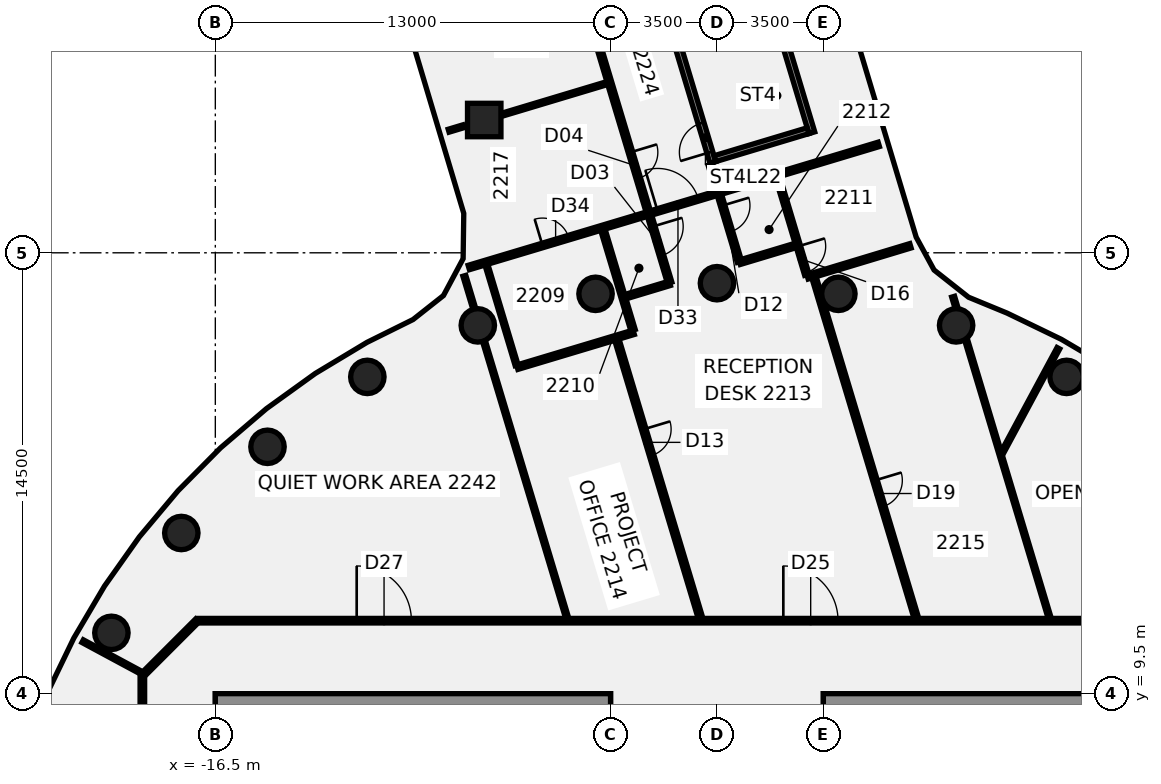
"""IFC4 building model, lengths in metres.
Left out: names, types, materials, properties, quantities, classifications, styles, units other than length and angle.
Written with IfcOpenShell. Run it as: python <this file> out.ifc"""

import sys

from ifc_helpers import new_model, si_unit, direction, frame, frame_2d, origin, origin_2d, place, context, subcontext, project, spatial, rectangle, circle, extrude, element, fill, save


model = new_model("IFC4")
c1 = context("Model", 3, precision=1e-05, world=origin(), true_north=direction((0.0, 1.0)))
c2 = subcontext(c1, "Body", "Model", "MODEL_VIEW")
j1 = project(units=[si_unit("LENGTHUNIT", "METRE"), si_unit("PLANEANGLEUNIT", "RADIAN")], contexts=[c1])
p1 = place(None, origin())
s1 = spatial("IfcSite", under=j1, at=p1, CompositionType="ELEMENT")
p2 = place(p1, origin())
s2 = spatial("IfcBuilding", under=s1, at=p2, CompositionType="ELEMENT")
p3 = place(p2, frame((0.0, 0.0, 94.75)))
s3 = spatial("IfcBuildingStorey", under=s2, at=p3, CompositionType="ELEMENT", Elevation=94.75)
for number, where, z_axis, x_axis in (
    (1, (11.5, 19.919, -0.14), (0.0, 0.0, 1.0), (1.0, 0.0, 0.0)),
    (2, (7.866, 21.613, -0.14), (0.0, 0.0, 1.0), (1.0, 0.0, 0.0)),
    (3, (3.994, 22.651, -0.14), (0.0, 0.0, 1.0), (1.0, 0.0, 0.0)),
    (4, (0.0, 23.0, -0.14), (0.0, 0.0, 1.0), (1.0, 0.0, 0.0)),
    (5, (-3.994, 22.651, -0.14), (0.0, 0.0, 1.0), (1.0, 0.0, 0.0)),
    (6, (-7.866, 21.613, -0.14), (0.0, 0.0, 1.0), (1.0, 0.0, 0.0)),
    (7, (-11.5, 19.919, -0.14), (0.0, 0.0, 1.0), (1.0, 0.0, 0.0)),
    (8, (-14.784, 17.619, -0.14), (0.0, 0.0, 1.0), (1.0, 0.0, 0.0)),
    (9, (-17.619, 14.784, -0.14), (0.0, 0.0, 1.0), (1.0, 0.0, 0.0)),
    (10, (-19.919, 11.5, -0.14), (0.0, 0.0, 1.0), (1.0, 0.0, 0.0)),
):
    element("IfcColumn", number, at=place(p3, frame(where, z_axis=z_axis, x_axis=x_axis)), inside=s3, PredefinedType="COLUMN", context=c2, shape_type="SweptSolid", body=[
        extrude(circle(Radius=0.55, at=origin_2d()), origin(), (0.0, 0.0, 1.0), 3.75),
    ])
p4 = place(p3, frame((-7.655, 28.367, -0.139), z_axis=(-0.030585033577, -0.037482934766, 0.998829107166), x_axis=(0.95704029612, 0.28717120329, 0.040082060869)))
e11 = element("IfcColumn", 11, at=p4, inside=s3, PredefinedType="COLUMN", context=c2, shape_type="SweptSolid", body=[
    extrude(rectangle(XDim=1.1, YDim=1.1, at=origin_2d()), origin(), (0.0, 0.0, 1.0), 3.752),
])
p5 = place(p3, frame((-8.309, 23.243, 0.0), z_axis=(0.0, 0.0, 1.0), x_axis=(0.287640433477, -0.957738472146, 0.0)))
e12 = element("IfcWall", 12, at=p5, inside=s3, PredefinedType="PARTITIONING", context=c2, shape_type="SweptSolid", body=[
    extrude(rectangle(XDim=1.148, YDim=0.1, at=frame_2d((0.574, 0.0))), origin(), (0.0, 0.0, 1.0), 3.01),
])
p6 = place(p3, frame((-7.667, 21.106, 0.0), z_axis=(0.0, 0.0, 1.0), x_axis=(0.287634372124, -0.95774029255, 0.0)))
e13 = element("IfcWall", 13, at=p6, inside=s3, PredefinedType="PARTITIONING", context=c2, shape_type="SweptSolid", body=[
    extrude(rectangle(XDim=9.538, YDim=0.1, at=frame_2d((4.769, 0.0))), origin(), (0.0, 0.0, 1.0), 3.01),
])
p7 = place(p3, frame((-7.584, 23.611, 0.0), z_axis=(0.0, 0.0, 1.0), x_axis=(0.287866572173, -0.957670526134, 0.0)))
e14 = element("IfcWall", 14, at=p7, inside=s3, PredefinedType="PARTITIONING", context=c2, shape_type="SweptSolid", body=[
    extrude(rectangle(XDim=3.454, YDim=0.1, at=frame_2d((1.727, 0.0))), origin(), (0.0, 0.0, 1.0), 3.01),
])
p8 = place(p3, frame((-7.398, 42.462, 0.0), z_axis=(0.0, 0.0, 1.0), x_axis=(0.287760411209, -0.957702430686, 0.0)))
e15 = element("IfcWall", 15, at=p8, inside=s3, PredefinedType="PARTITIONING", context=c2, shape_type="SweptSolid", body=[
    extrude(rectangle(XDim=20.305, YDim=0.15, at=frame_2d((10.153, 0.0))), origin(), (0.0, 0.0, 1.0), 3.01),
])
p9 = place(p8, frame((18.376, 0.0, 0.0)))
e16 = element("IfcOpeningElement", 16, at=p9, cuts=e15, PredefinedType="OPENING", context=c2, shape_type="SweptSolid", body=[
    extrude(rectangle(XDim=1.0, YDim=2.1, at=frame_2d((0.5, 1.05))), frame((0.0, 0.085, 0.0), z_axis=(0.0, -1.0, 0.0), x_axis=(1.0, 0.0, 0.0)), (0.0, 0.0, 1.0), 0.17),
])
p10 = place(p8, frame((15.825, 0.0, 0.0)))
e17 = element("IfcOpeningElement", 17, at=p10, cuts=e15, PredefinedType="OPENING", context=c2, shape_type="SweptSolid", body=[
    extrude(rectangle(XDim=0.9, YDim=2.1, at=frame_2d((0.45, 1.05))), frame((0.0, 0.085, 0.0), z_axis=(0.0, -1.0, 0.0), x_axis=(1.0, 0.0, 0.0)), (0.0, 0.0, 1.0), 0.17),
])
p11 = place(p8, frame((10.125, 0.0, 0.0)))
e18 = element("IfcOpeningElement", 18, at=p11, cuts=e15, PredefinedType="OPENING", context=c2, shape_type="SweptSolid", body=[
    extrude(rectangle(XDim=0.9, YDim=2.1, at=frame_2d((0.45, 1.05))), frame((0.0, 0.085, 0.0), z_axis=(0.0, -1.0, 0.0), x_axis=(1.0, 0.0, 0.0)), (0.0, 0.0, 1.0), 0.17),
])
p12 = place(p8, frame((6.825, 0.0, 0.0)))
e19 = element("IfcOpeningElement", 19, at=p12, cuts=e15, PredefinedType="OPENING", context=c2, shape_type="SweptSolid", body=[
    extrude(rectangle(XDim=0.9, YDim=2.1, at=frame_2d((0.45, 1.05))), frame((0.0, 0.085, 0.0), z_axis=(0.0, -1.0, 0.0), x_axis=(1.0, 0.0, 0.0)), (0.0, 0.0, 1.0), 0.17),
])
p13 = place(p8, frame((2.325, 0.0, 0.0)))
e20 = element("IfcOpeningElement", 20, at=p13, cuts=e15, PredefinedType="OPENING", context=c2, shape_type="SweptSolid", body=[
    extrude(rectangle(XDim=0.9, YDim=2.1, at=frame_2d((0.45, 1.05))), frame((0.0, 0.085, 0.0), z_axis=(0.0, -1.0, 0.0), x_axis=(1.0, 0.0, 0.0)), (0.0, 0.0, 1.0), 0.17),
])
p14 = place(p3, frame((-0.22, 26.903, 0.0), z_axis=(0.0, 0.0, 1.0), x_axis=(0.287616169205, -0.957745759172, 0.0)))
e21 = element("IfcWall", 21, at=p14, inside=s3, PredefinedType="PARTITIONING", context=c2, shape_type="SweptSolid", body=[
    extrude(rectangle(XDim=3.339, YDim=0.15, at=frame_2d((1.67, 0.0))), origin(), (0.0, 0.0, 1.0), 3.01),
])
p15 = place(p14, frame((1.409, 0.0, 0.0)))
e22 = element("IfcOpeningElement", 22, at=p15, cuts=e21, PredefinedType="OPENING", context=c2, shape_type="SweptSolid", body=[
    extrude(rectangle(XDim=0.9, YDim=2.1, at=frame_2d((0.45, 1.05))), frame((0.0, 0.085, 0.0), z_axis=(0.0, -1.0, 0.0), x_axis=(1.0, 0.0, 0.0)), (0.0, 0.0, 1.0), 0.17),
])
p16 = place(p3, frame((-3.752, 24.757, 0.0), z_axis=(0.0, 0.0, 1.0), x_axis=(0.287770428937, -0.957699420606, 0.0)))
e23 = element("IfcWall", 23, at=p16, inside=s3, PredefinedType="PARTITIONING", context=c2, shape_type="SweptSolid", body=[
    extrude(rectangle(XDim=3.445, YDim=0.15, at=frame_2d((1.723, 0.0))), origin(), (0.0, 0.0, 1.0), 3.01),
])
p17 = place(p3, frame((-3.292, 21.141, 0.0), z_axis=(0.0, 0.0, 1.0), x_axis=(0.287642802336, -0.957737760697, 0.0)))
e24 = element("IfcWall", 24, at=p17, inside=s3, PredefinedType="PARTITIONING", context=c2, shape_type="SweptSolid", body=[
    extrude(rectangle(XDim=9.569, YDim=0.15, at=frame_2d((4.784, 0.0))), origin(), (0.0, 0.0, 1.0), 3.01),
])
p18 = place(p17, frame((3.075, 0.0, 0.0)))
e25 = element("IfcOpeningElement", 25, at=p18, cuts=e24, PredefinedType="OPENING", context=c2, shape_type="SweptSolid", body=[
    extrude(rectangle(XDim=0.9, YDim=2.1, at=frame_2d((0.45, 1.05))), frame((0.0, 0.085, 0.0), z_axis=(0.0, -1.0, 0.0), x_axis=(1.0, 0.0, 0.0)), (0.0, 0.0, 1.0), 0.17),
])
p19 = place(p3, frame((1.978, 26.541, 0.0), z_axis=(0.0, 0.0, 1.0), x_axis=(0.287472876761, -0.957788778973, 0.0)))
e26 = element("IfcWall", 26, at=p19, inside=s3, PredefinedType="PARTITIONING", context=c2, shape_type="SweptSolid", body=[
    extrude(rectangle(XDim=3.405, YDim=0.15, at=frame_2d((1.702, 0.0))), origin(), (0.0, 0.0, 1.0), 3.01),
])
p20 = place(p19, frame((2.43, 0.0, 0.0)))
e27 = element("IfcOpeningElement", 27, at=p20, cuts=e26, PredefinedType="OPENING", context=c2, shape_type="SweptSolid", body=[
    extrude(rectangle(XDim=0.9, YDim=2.1, at=frame_2d((0.45, 1.05))), frame((0.0, 0.085, 0.0), z_axis=(0.0, -1.0, 0.0), x_axis=(1.0, 0.0, 0.0)), (0.0, 0.0, 1.0), 0.17),
])
p21 = place(p3, frame((3.192, 23.194, 0.0), z_axis=(0.0, 0.0, 1.0), x_axis=(0.287594570401, -0.957752245143, 0.0)))
e28 = element("IfcWall", 28, at=p21, inside=s3, PredefinedType="PARTITIONING", context=c2, shape_type="SweptSolid", body=[
    extrude(rectangle(XDim=11.712, YDim=0.15, at=frame_2d((5.856, 0.0))), origin(), (0.0, 0.0, 1.0), 3.01),
])
p22 = place(p21, frame((6.975, 0.0, 0.0)))
e29 = element("IfcOpeningElement", 29, at=p22, cuts=e28, PredefinedType="OPENING", context=c2, shape_type="SweptSolid", body=[
    extrude(rectangle(XDim=0.9, YDim=2.1, at=frame_2d((0.45, 1.05))), frame((0.0, 0.085, 0.0), z_axis=(0.0, -1.0, 0.0), x_axis=(1.0, 0.0, 0.0)), (0.0, 0.0, 1.0), 0.17),
])
p23 = place(p3, frame((7.768, 22.556, 0.0), z_axis=(0.0, 0.0, 1.0), x_axis=(0.287679851286, -0.957726632794, 0.0)))
e30 = element("IfcWall", 30, at=p23, inside=s3, PredefinedType="PARTITIONING", context=c2, shape_type="SweptSolid", body=[
    extrude(rectangle(XDim=0.405, YDim=0.1, at=frame_2d((0.202, 0.0))), origin(), (0.0, 0.0, 1.0), 3.01),
])
p24 = place(p3, frame((8.186, 21.167, 0.0), z_axis=(0.0, 0.0, 1.0), x_axis=(0.287669804992, -0.957729650421, 0.0)))
e31 = element("IfcWall", 31, at=p24, inside=s3, PredefinedType="PARTITIONING", context=c2, shape_type="SweptSolid", body=[
    extrude(rectangle(XDim=9.601, YDim=0.1, at=frame_2d((4.801, 0.0))), origin(), (0.0, 0.0, 1.0), 3.01),
])
p25 = place(p3, frame((-20.864, 11.227, 0.0), z_axis=(0.0, 0.0, 1.0), x_axis=(0.880553155986, -0.4739474016, 0.0)))
e32 = element("IfcWall", 32, at=p25, inside=s3, PredefinedType="PARTITIONING", context=c2, shape_type="SweptSolid", body=[
    extrude(rectangle(XDim=2.197, YDim=0.1, at=frame_2d((1.099, 0.0))), origin(), (0.0, 0.0, 1.0), 3.01),
])
p26 = place(p3, frame((-17.065, 11.9, 0.0), z_axis=(0.0, 0.0, 1.0), x_axis=(1.0, 0.0, 0.0)))
e33 = element("IfcWall", 33, at=p26, inside=s3, PredefinedType="PARTITIONING", context=c2, shape_type="SweptSolid", body=[
    extrude(rectangle(XDim=34.165, YDim=0.15, at=frame_2d((17.083, 0.0))), origin(), (0.0, 0.0, 1.0), 3.01),
])
p27 = place(p26, frame((19.248, 0.0, 0.0)))
e34 = element("IfcOpeningElement", 34, at=p27, cuts=e33, PredefinedType="OPENING", context=c2, shape_type="SweptSolid", body=[
    extrude(rectangle(XDim=1.8, YDim=2.1, at=frame_2d((0.9, 1.05))), frame((0.0, 0.085, 0.0), z_axis=(0.0, -1.0, 0.0), x_axis=(1.0, 0.0, 0.0)), (0.0, 0.0, 1.0), 0.17),
])
p28 = place(p26, frame((30.734, 0.0, 0.0)))
e35 = element("IfcOpeningElement", 35, at=p28, cuts=e33, PredefinedType="OPENING", context=c2, shape_type="SweptSolid", body=[
    extrude(rectangle(XDim=1.8, YDim=2.1, at=frame_2d((0.9, 1.05))), frame((0.0, 0.085, 0.0), z_axis=(0.0, -1.0, 0.0), x_axis=(1.0, 0.0, 0.0)), (0.0, 0.0, 1.0), 0.17),
])
p29 = place(p26, frame((5.215, 0.0, 0.0)))
e36 = element("IfcOpeningElement", 36, at=p29, cuts=e33, PredefinedType="OPENING", context=c2, shape_type="SweptSolid", body=[
    extrude(rectangle(XDim=1.8, YDim=2.1, at=frame_2d((0.9, 1.05))), frame((0.0, 0.085, 0.0), z_axis=(0.0, -1.0, 0.0), x_axis=(1.0, 0.0, 0.0)), (0.0, 0.0, 1.0), 0.17),
])
p30 = place(p3, frame((-8.826, 28.015, 0.0), z_axis=(0.0, 0.0, 1.0), x_axis=(0.957665253554, 0.287884112335, 0.0)))
e37 = element("IfcWall", 37, at=p30, inside=s3, PredefinedType="PARTITIONING", context=c2, shape_type="SweptSolid", body=[
    extrude(rectangle(XDim=0.501, YDim=0.1, at=frame_2d((0.25, 0.0))), origin(), (0.0, 0.0, 1.0), 3.01),
])
p31 = place(p3, frame((-7.105, 28.532, 0.0), z_axis=(0.0, 0.0, 1.0), x_axis=(0.957708415849, 0.28774049109, 0.0)))
e38 = element("IfcWall", 38, at=p31, inside=s3, PredefinedType="PARTITIONING", context=c2, shape_type="SweptSolid", body=[
    extrude(rectangle(XDim=3.651, YDim=0.1, at=frame_2d((1.825, 0.0))), origin(), (0.0, 0.0, 1.0), 3.01),
])
p32 = place(p3, frame((-8.163, 23.516, 0.0), z_axis=(0.0, 0.0, 1.0), x_axis=(0.958017839909, 0.286708594946, 0.0)))
e39 = element("IfcWall", 39, at=p32, inside=s3, PredefinedType="PARTITIONING", context=c2, shape_type="SweptSolid", body=[
    extrude(rectangle(XDim=10.582, YDim=0.15, at=frame_2d((5.291, 0.0))), origin(), (0.0, 0.0, 1.0), 3.01),
])
p33 = place(p32, frame((6.482, 0.0, 0.0)))
e40 = element("IfcOpeningElement", 40, at=p33, cuts=e39, PredefinedType="OPENING", context=c2, shape_type="SweptSolid", body=[
    extrude(rectangle(XDim=1.4, YDim=2.1, at=frame_2d((0.7, 1.05))), frame((0.0, 0.085, 0.0), z_axis=(0.0, -1.0, 0.0), x_axis=(1.0, 0.0, 0.0)), (0.0, 0.0, 1.0), 0.17),
])
p34 = place(p32, frame((2.531, 0.0, 0.0)))
e41 = element("IfcOpeningElement", 41, at=p34, cuts=e39, PredefinedType="OPENING", context=c2, shape_type="SweptSolid", body=[
    extrude(rectangle(XDim=0.9, YDim=2.1, at=frame_2d((0.45, 1.05))), frame((0.0, 0.085, 0.0), z_axis=(0.0, -1.0, 0.0), x_axis=(1.0, 0.0, 0.0)), (0.0, 0.0, 1.0), 0.17),
])
p35 = place(p3, frame((-6.57, 20.236, 0.0), z_axis=(0.0, 0.0, 1.0), x_axis=(0.9578195651, 0.287370285017, 0.0)))
e42 = element("IfcWall", 42, at=p35, inside=s3, PredefinedType="PARTITIONING", context=c2, shape_type="SweptSolid", body=[
    extrude(rectangle(XDim=4.0, YDim=0.15, at=frame_2d((2.0, 0.0))), origin(), (0.0, 0.0, 1.0), 3.01),
])
p36 = place(p3, frame((-3.012, 22.557, 0.0), z_axis=(0.0, 0.0, 1.0), x_axis=(0.957574748886, 0.288185010533, 0.0)))
e43 = element("IfcWall", 43, at=p36, inside=s3, PredefinedType="PARTITIONING", context=c2, shape_type="SweptSolid", body=[
    extrude(rectangle(XDim=1.525, YDim=0.15, at=frame_2d((0.762, 0.0))), origin(), (0.0, 0.0, 1.0), 3.01),
])
p37 = place(p3, frame((0.747, 23.688, 0.0), z_axis=(0.0, 0.0, 1.0), x_axis=(0.957581258756, 0.288163378795, 0.0)))
e44 = element("IfcWall", 44, at=p37, inside=s3, PredefinedType="PARTITIONING", context=c2, shape_type="SweptSolid", body=[
    extrude(rectangle(XDim=1.922, YDim=0.15, at=frame_2d((0.961, 0.0))), origin(), (0.0, 0.0, 1.0), 3.01),
])
p38 = place(p3, frame((1.972, 26.56, 0.0), z_axis=(0.0, 0.0, 1.0), x_axis=(0.957720591323, 0.287699963426, 0.0)))
e45 = element("IfcWall", 45, at=p38, inside=s3, PredefinedType="PARTITIONING", context=c2, shape_type="SweptSolid", body=[
    extrude(rectangle(XDim=3.499, YDim=0.15, at=frame_2d((1.75, 0.0))), origin(), (0.0, 0.0, 1.0), 3.01),
])
p39 = place(p3, frame((2.978, 23.208, 0.0), z_axis=(0.0, 0.0, 1.0), x_axis=(0.957277630695, 0.289170430319, 0.0)))
e46 = element("IfcWall", 46, at=p39, inside=s3, PredefinedType="PARTITIONING", context=c2, shape_type="SweptSolid", body=[
    extrude(rectangle(XDim=3.538, YDim=0.15, at=frame_2d((1.769, 0.0))), origin(), (0.0, 0.0, 1.0), 3.01),
])
p40 = place(p3, frame((-18.872, 10.128, 0.0), z_axis=(0.0, 0.0, 1.0), x_axis=(0.707106781187, 0.707106781187, 0.0)))
e47 = element("IfcWall", 47, at=p40, inside=s3, PredefinedType="PARTITIONING", context=c2, shape_type="SweptSolid", body=[
    extrude(rectangle(XDim=2.505, YDim=0.15, at=frame_2d((1.253, 0.0))), origin(), (0.0, 0.0, 1.0), 3.01),
])
p41 = place(p3, frame((9.383, 17.427, 0.0), z_axis=(0.0, 0.0, 1.0), x_axis=(0.47397663643, 0.880537420056, 0.0)))
e48 = element("IfcWall", 48, at=p41, inside=s3, PredefinedType="PARTITIONING", context=c2, shape_type="SweptSolid", body=[
    extrude(rectangle(XDim=3.9, YDim=0.1, at=frame_2d((1.95, 0.0))), origin(), (0.0, 0.0, 1.0), 3.01),
])
p42 = place(p3, frame((-18.9, -10.1, 0.0), z_axis=(0.0, 0.0, 1.0), x_axis=(0.0, 1.0, 0.0)))
e49 = element("IfcWall", 49, at=p42, inside=s3, PredefinedType="PARTITIONING", context=c2, shape_type="SweptSolid", body=[
    extrude(rectangle(XDim=20.2, YDim=0.15, at=frame_2d((10.1, 0.0))), origin(), (0.0, 0.0, 1.0), 3.01),
])
p43 = place(p42, frame((10.931, 0.0, 0.0)))
e50 = element("IfcOpeningElement", 50, at=p43, cuts=e49, PredefinedType="OPENING", context=c2, shape_type="SweptSolid", body=[
    extrude(rectangle(XDim=1.8, YDim=2.1, at=frame_2d((0.9, 1.05))), frame((0.0, 0.085, 0.0), z_axis=(0.0, -1.0, 0.0), x_axis=(1.0, 0.0, 0.0)), (0.0, 0.0, 1.0), 0.17),
])
p44 = place(p42, frame((4.296, 0.0, 0.0)))
e51 = element("IfcOpeningElement", 51, at=p44, cuts=e49, PredefinedType="OPENING", context=c2, shape_type="SweptSolid", body=[
    extrude(rectangle(XDim=0.9, YDim=2.1, at=frame_2d((0.45, 1.05))), frame((0.0, 0.085, 0.0), z_axis=(0.0, -1.0, 0.0), x_axis=(1.0, 0.0, 0.0)), (0.0, 0.0, 1.0), 0.17),
])
for number, where, z_axis, x_axis in (
    (52, (-16.5, 9.2, 0.0), (0.0, 0.0, 1.0), (1.0, 0.0, 0.0)),
    (53, (16.5, 9.2, 0.0), (0.0, 0.0, 1.0), (-1.0, 0.0, 0.0)),
):
    element("IfcWall", number, at=place(p3, frame(where, z_axis=z_axis, x_axis=x_axis)), inside=s3, PredefinedType="SHEAR", context=c2, shape_type="SweptSolid", body=[
        extrude(rectangle(XDim=13.0, YDim=0.6, at=frame_2d((6.5, 0.0))), origin(), (0.0, 0.0, 1.0), 3.61),
    ])
p45 = place(p3, frame((-0.135, 26.971, -0.14), z_axis=(0.0, 0.0, 1.0), x_axis=(-0.287652089352, 0.957734971426, 0.0)))
e54 = element("IfcWall", 54, at=p45, inside=s3, PredefinedType="SHEAR", context=c2, shape_type="SweptSolid", body=[
    extrude(rectangle(XDim=6.7, YDim=0.2, at=frame_2d((3.35, 0.0))), origin(), (0.0, 0.0, 1.0), 3.15),
])
p46 = place(p45, frame((0.35, 0.0, 0.0)))
e55 = element("IfcOpeningElement", 55, at=p46, cuts=e54, PredefinedType="OPENING", context=c2, shape_type="SweptSolid", body=[
    extrude(rectangle(XDim=1.0, YDim=2.1, at=frame_2d((0.5, 1.05))), frame((0.0, 0.11, 0.0), z_axis=(0.0, -1.0, 0.0), x_axis=(1.0, 0.0, 0.0)), (0.0, 0.0, 1.0), 0.22),
])
p47 = place(p3, frame((3.121, 27.949, -0.14), z_axis=(0.0, 0.0, 1.0), x_axis=(-0.28761866462, 0.957745009782, 0.0)))
e56 = element("IfcWall", 56, at=p47, inside=s3, PredefinedType="SHEAR", context=c2, shape_type="SweptSolid", body=[
    extrude(rectangle(XDim=6.7, YDim=0.2, at=frame_2d((3.35, 0.0))), origin(), (0.0, 0.0, 1.0), 3.15),
])
p48 = place(p3, frame((2.996, 28.016, -0.14), z_axis=(0.0, 0.0, 1.0), x_axis=(-0.95774014706, -0.287634856562, 0.0)))
e57 = element("IfcWall", 57, at=p48, inside=s3, PredefinedType="SHEAR", context=c2, shape_type="SweptSolid", body=[
    extrude(rectangle(XDim=3.2, YDim=0.2, at=frame_2d((1.6, 0.0))), origin(), (0.0, 0.0, 1.0), 3.15),
])
p49 = place(p9, frame((1.0, 0.0, 0.0), z_axis=(0.0, 0.0, 1.0), x_axis=(-1.0, 0.0, 0.0)))
e58 = element("IfcDoor", 58, at=p49, inside=s3, OperationType="SINGLE_SWING_RIGHT", PredefinedType="DOOR", context=c2, shape_type="SweptSolid", body=[
    extrude(rectangle(XDim=1.0, YDim=2.1, at=frame_2d((0.5, 1.05))), frame((0.0, 0.025, 0.0), z_axis=(0.0, -1.0, 0.0), x_axis=(1.0, 0.0, 0.0)), (0.0, 0.0, 1.0), 0.05),
])
fill(e16, e58)
p50 = place(p10, frame((0.9, 0.0, 0.0), z_axis=(0.0, 0.0, 1.0), x_axis=(-1.0, 0.0, 0.0)))
e59 = element("IfcDoor", 59, at=p50, inside=s3, OperationType="SINGLE_SWING_RIGHT", PredefinedType="DOOR", context=c2, shape_type="SweptSolid", body=[
    extrude(rectangle(XDim=0.9, YDim=2.1, at=frame_2d((0.45, 1.05))), frame((0.0, 0.025, 0.0), z_axis=(0.0, -1.0, 0.0), x_axis=(1.0, 0.0, 0.0)), (0.0, 0.0, 1.0), 0.05),
])
fill(e17, e59)
p51 = place(p15, origin())
e60 = element("IfcDoor", 60, at=p51, inside=s3, OperationType="SINGLE_SWING_LEFT", PredefinedType="DOOR", context=c2, shape_type="SweptSolid", body=[
    extrude(rectangle(XDim=0.9, YDim=2.1, at=frame_2d((0.45, 1.05))), frame((0.0, 0.025, 0.0), z_axis=(0.0, -1.0, 0.0), x_axis=(1.0, 0.0, 0.0)), (0.0, 0.0, 1.0), 0.05),
])
fill(e22, e60)
p52 = place(p18, frame((0.9, 0.0, 0.0), z_axis=(0.0, 0.0, 1.0), x_axis=(-1.0, 0.0, 0.0)))
e61 = element("IfcDoor", 61, at=p52, inside=s3, OperationType="SINGLE_SWING_LEFT", PredefinedType="DOOR", context=c2, shape_type="SweptSolid", body=[
    extrude(rectangle(XDim=0.9, YDim=2.1, at=frame_2d((0.45, 1.05))), frame((0.0, 0.025, 0.0), z_axis=(0.0, -1.0, 0.0), x_axis=(1.0, 0.0, 0.0)), (0.0, 0.0, 1.0), 0.05),
])
fill(e25, e61)
p53 = place(p20, origin())
e62 = element("IfcDoor", 62, at=p53, inside=s3, OperationType="SINGLE_SWING_LEFT", PredefinedType="DOOR", context=c2, shape_type="SweptSolid", body=[
    extrude(rectangle(XDim=0.9, YDim=2.1, at=frame_2d((0.45, 1.05))), frame((0.0, 0.025, 0.0), z_axis=(0.0, -1.0, 0.0), x_axis=(1.0, 0.0, 0.0)), (0.0, 0.0, 1.0), 0.05),
])
fill(e27, e62)
p54 = place(p22, origin())
e63 = element("IfcDoor", 63, at=p54, inside=s3, OperationType="SINGLE_SWING_LEFT", PredefinedType="DOOR", context=c2, shape_type="SweptSolid", body=[
    extrude(rectangle(XDim=0.9, YDim=2.1, at=frame_2d((0.45, 1.05))), frame((0.0, 0.025, 0.0), z_axis=(0.0, -1.0, 0.0), x_axis=(1.0, 0.0, 0.0)), (0.0, 0.0, 1.0), 0.05),
])
fill(e29, e63)
p55 = place(p27, frame((1.8, 0.0, 0.0), z_axis=(0.0, 0.0, 1.0), x_axis=(-1.0, 0.0, 0.0)))
e64 = element("IfcDoor", 64, at=p55, inside=s3, OperationType="DOUBLE_DOOR_SINGLE_SWING", PredefinedType="DOOR", context=c2, shape_type="SweptSolid", body=[
    extrude(rectangle(XDim=1.8, YDim=2.1, at=frame_2d((0.9, 1.05))), frame((0.0, 0.025, 0.0), z_axis=(0.0, -1.0, 0.0), x_axis=(1.0, 0.0, 0.0)), (0.0, 0.0, 1.0), 0.05),
])
fill(e34, e64)
p56 = place(p29, origin())
e65 = element("IfcDoor", 65, at=p56, inside=s3, OperationType="DOUBLE_DOOR_SINGLE_SWING", PredefinedType="DOOR", context=c2, shape_type="SweptSolid", body=[
    extrude(rectangle(XDim=1.8, YDim=2.1, at=frame_2d((0.9, 1.05))), frame((0.0, 0.025, 0.0), z_axis=(0.0, -1.0, 0.0), x_axis=(1.0, 0.0, 0.0)), (0.0, 0.0, 1.0), 0.05),
])
fill(e36, e65)
p57 = place(p33, frame((1.4, 0.0, 0.0), z_axis=(0.0, 0.0, 1.0), x_axis=(-1.0, 0.0, 0.0)))
e66 = element("IfcDoor", 66, at=p57, inside=s3, OperationType="DOUBLE_DOOR_SINGLE_SWING", PredefinedType="DOOR", context=c2, shape_type="SweptSolid", body=[
    extrude(rectangle(XDim=1.4, YDim=2.1, at=frame_2d((0.7, 1.05))), frame((0.0, 0.025, 0.0), z_axis=(0.0, -1.0, 0.0), x_axis=(1.0, 0.0, 0.0)), (0.0, 0.0, 1.0), 0.05),
])
fill(e40, e66)
p58 = place(p34, frame((0.9, 0.0, 0.0), z_axis=(0.0, 0.0, 1.0), x_axis=(-1.0, 0.0, 0.0)))
e67 = element("IfcDoor", 67, at=p58, inside=s3, OperationType="SINGLE_SWING_LEFT", PredefinedType="DOOR", context=c2, shape_type="SweptSolid", body=[
    extrude(rectangle(XDim=0.9, YDim=2.1, at=frame_2d((0.45, 1.05))), frame((0.0, 0.025, 0.0), z_axis=(0.0, -1.0, 0.0), x_axis=(1.0, 0.0, 0.0)), (0.0, 0.0, 1.0), 0.05),
])
fill(e41, e67)
p59 = place(p46, origin())
e68 = element("IfcDoor", 68, at=p59, inside=s3, OperationType="SINGLE_SWING_LEFT", PredefinedType="DOOR", context=c2, shape_type="SweptSolid", body=[
    extrude(rectangle(XDim=1.0, YDim=2.1, at=frame_2d((0.5, 1.05))), frame((0.0, 0.025, 0.0), z_axis=(0.0, -1.0, 0.0), x_axis=(1.0, 0.0, 0.0)), (0.0, 0.0, 1.0), 0.05),
])
fill(e55, e68)
save(model, sys.argv[1])
